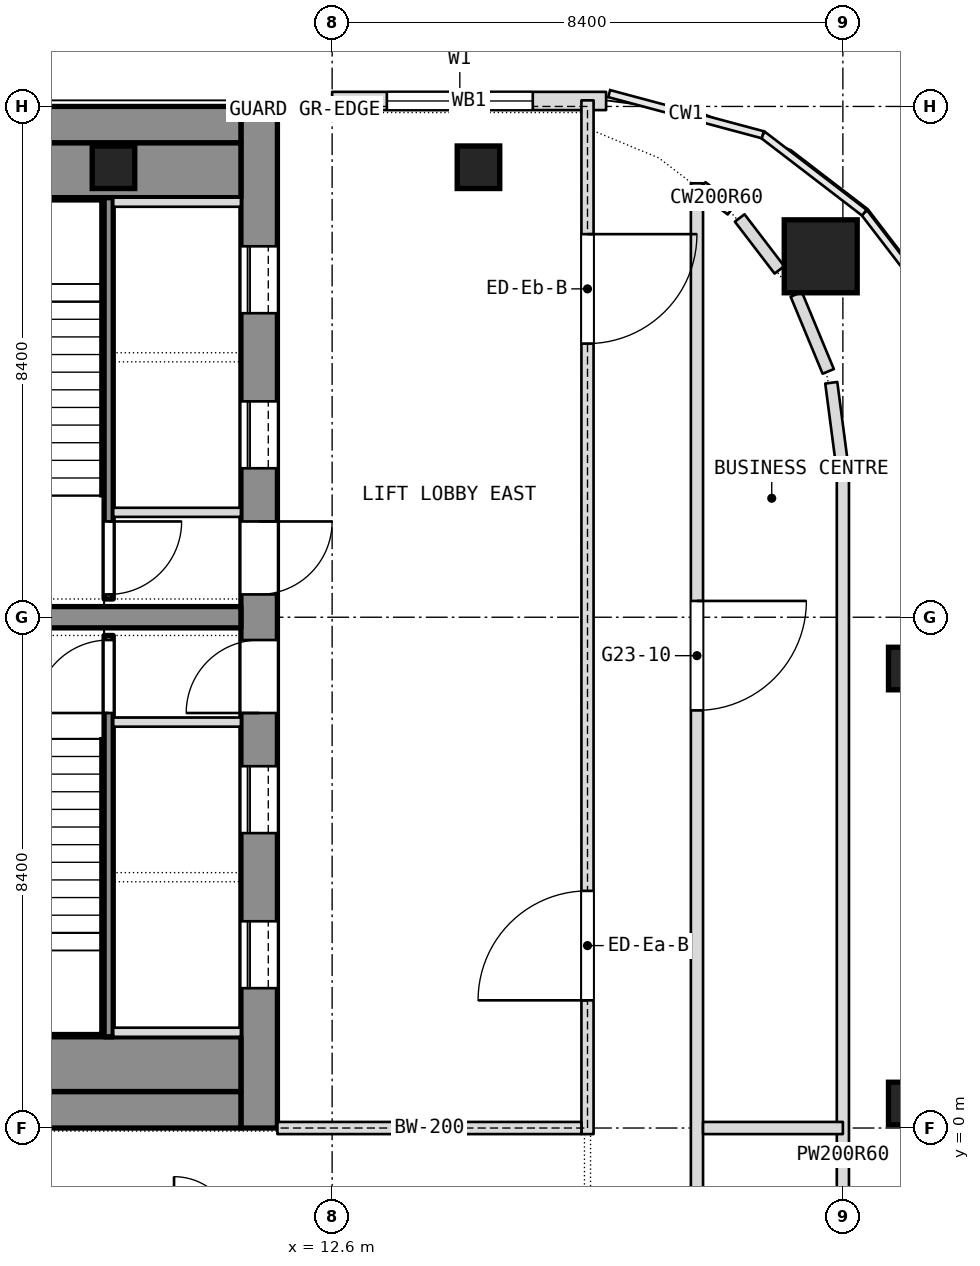
"""IFC4 building model, lengths in metres.
Left out: names, types, materials, properties, quantities, classifications, styles, units other than length and angle.
Written with IfcOpenShell. Run it as: python <this file> out.ifc"""

import sys

from ifc_helpers import new_model, si_unit, direction, frame, frame_2d, origin, origin_2d, place, context, subcontext, project, spatial, rectangle, extrude, element, fill, save


model = new_model("IFC4")
c1 = context("Model", 3, precision=1e-05, world=origin(), true_north=direction((0.0, 1.0)))
c2 = subcontext(c1, "Body", "Model", "MODEL_VIEW")
j1 = project(units=[si_unit("LENGTHUNIT", "METRE"), si_unit("PLANEANGLEUNIT", "RADIAN")], contexts=[c1])
p1 = place(None, origin())
s1 = spatial("IfcSite", under=j1, at=p1, CompositionType="ELEMENT")
p2 = place(p1, origin())
s2 = spatial("IfcBuilding", under=s1, at=p2, CompositionType="ELEMENT")
p3 = place(p2, frame((0.0, 0.0, 274.1)))
s3 = spatial("IfcBuildingStorey", under=s2, at=p3, CompositionType="ELEMENT", Elevation=274.1)
p4 = place(p3, frame((11.4, 0.0, 0.0), z_axis=(0.0, 0.0, 1.0), x_axis=(0.0, 1.0, 0.0)))
e1 = element("IfcWall", 1, at=p4, inside=s3, PredefinedType="SHEAR", context=c2, shape_type="SweptSolid", body=[
    extrude(rectangle(XDim=16.8, YDim=0.6, at=frame_2d((8.4, 0.0))), origin(), (0.0, 0.0, 1.0), 3.6),
])
p5 = place(p4, frame((2.3, 0.0, 0.0)))
e2 = element("IfcOpeningElement", 2, at=p5, cuts=e1, PredefinedType="OPENING", context=c2, shape_type="SweptSolid", body=[
    extrude(rectangle(XDim=1.1, YDim=2.1, at=frame_2d((0.55, 1.05))), frame((0.0, 0.3, 0.0), z_axis=(0.0, -1.0, 0.0), x_axis=(1.0, 0.0, 0.0)), (0.0, 0.0, 1.0), 0.6),
])
p6 = place(p4, frame((4.85, 0.0, 0.0)))
e3 = element("IfcOpeningElement", 3, at=p6, cuts=e1, PredefinedType="OPENING", context=c2, shape_type="SweptSolid", body=[
    extrude(rectangle(XDim=1.1, YDim=2.1, at=frame_2d((0.55, 1.05))), frame((0.0, 0.3, 0.0), z_axis=(0.0, -1.0, 0.0), x_axis=(1.0, 0.0, 0.0)), (0.0, 0.0, 1.0), 0.6),
])
p7 = place(p4, frame((6.825, 0.0, 0.0)))
e4 = element("IfcOpeningElement", 4, at=p7, cuts=e1, PredefinedType="OPENING", context=c2, shape_type="SweptSolid", body=[
    extrude(rectangle(XDim=1.2, YDim=2.1, at=frame_2d((0.6, 1.05))), frame((0.0, 0.3, 0.0), z_axis=(0.0, -1.0, 0.0), x_axis=(1.0, 0.0, 0.0)), (0.0, 0.0, 1.0), 0.6),
])
p8 = place(p4, frame((13.4, 0.0, 0.0)))
e5 = element("IfcOpeningElement", 5, at=p8, cuts=e1, PredefinedType="OPENING", context=c2, shape_type="SweptSolid", body=[
    extrude(rectangle(XDim=1.1, YDim=2.1, at=frame_2d((0.55, 1.05))), frame((0.0, 0.3, 0.0), z_axis=(0.0, -1.0, 0.0), x_axis=(1.0, 0.0, 0.0)), (0.0, 0.0, 1.0), 0.6),
])
p9 = place(p4, frame((10.85, 0.0, 0.0)))
e6 = element("IfcOpeningElement", 6, at=p9, cuts=e1, PredefinedType="OPENING", context=c2, shape_type="SweptSolid", body=[
    extrude(rectangle(XDim=1.1, YDim=2.1, at=frame_2d((0.55, 1.05))), frame((0.0, 0.3, 0.0), z_axis=(0.0, -1.0, 0.0), x_axis=(1.0, 0.0, 0.0)), (0.0, 0.0, 1.0), 0.6),
])
p10 = place(p4, frame((8.775, 0.0, 0.0)))
e7 = element("IfcOpeningElement", 7, at=p10, cuts=e1, PredefinedType="OPENING", context=c2, shape_type="SweptSolid", body=[
    extrude(rectangle(XDim=1.2, YDim=2.1, at=frame_2d((0.6, 1.05))), frame((0.0, 0.3, 0.0), z_axis=(0.0, -1.0, 0.0), x_axis=(1.0, 0.0, 0.0)), (0.0, 0.0, 1.0), 0.6),
])
for number, where, z_axis, x_axis in (
    (8, (-11.1, 0.3, 0.0), (0.0, 0.0, 1.0), (1.0, 0.0, 0.0)),
    (9, (-11.1, 16.5, 0.0), (0.0, 0.0, 1.0), (1.0, 0.0, 0.0)),
):
    element("IfcWall", number, at=place(p3, frame(where, z_axis=z_axis, x_axis=x_axis)), inside=s3, PredefinedType="SHEAR", context=c2, shape_type="SweptSolid", body=[
        extrude(rectangle(XDim=22.2, YDim=0.6, at=frame_2d((11.1, 0.0))), origin(), (0.0, 0.0, 1.0), 3.6),
    ])
p11 = place(p3, frame((4.375, 8.4, 0.0), z_axis=(0.0, 0.0, 1.0), x_axis=(1.0, 0.0, 0.0)))
e10 = element("IfcWall", 10, at=p11, inside=s3, PredefinedType="SHEAR", context=c2, shape_type="SweptSolid", body=[
    extrude(rectangle(XDim=6.725, YDim=0.35, at=frame_2d((3.363, 0.0))), origin(), (0.0, 0.0, 1.0), 3.6),
])
p12 = place(p3, frame((20.635, 14.335, 0.0), z_axis=(0.0, 0.0, 1.0), x_axis=(1.0, 0.0, 0.0)))
e11 = element("IfcColumn", 11, at=p12, inside=s3, PredefinedType="COLUMN", context=c2, shape_type="SweptSolid", body=[
    extrude(rectangle(XDim=1.2, YDim=1.2, at=origin_2d()), origin(), (0.0, 0.0, 1.0), 3.6),
])
for number, where, z_axis, x_axis in (
    (12, (9.004, 15.8, 0.0), (0.0, 0.0, 1.0), (1.0, 0.0, 0.0)),
    (13, (15.007, 15.8, 0.0), (0.0, 0.0, 1.0), (1.0, 0.0, 0.0)),
    (14, (22.1, 7.556, 0.0), (0.0, 0.0, 1.0), (1.0, 0.0, 0.0)),
    (15, (22.1, 0.403, 0.0), (0.0, 0.0, 1.0), (1.0, 0.0, 0.0)),
):
    element("IfcColumn", number, at=place(p3, frame(where, z_axis=z_axis, x_axis=x_axis)), inside=s3, PredefinedType="COLUMN", context=c2, shape_type="SweptSolid", body=[
        extrude(rectangle(XDim=0.7, YDim=0.7, at=origin_2d()), origin(), (0.0, 0.0, 1.0), 3.6),
    ])
p13 = place(p3, frame((21.0, -11.6, 0.0), z_axis=(0.0, 0.0, 1.0), x_axis=(0.0, 1.0, 0.0)))
e16 = element("IfcWall", 16, at=p13, inside=s3, PredefinedType="PARTITIONING", context=c2, shape_type="SweptSolid", body=[
    extrude(rectangle(XDim=22.302, YDim=0.2, at=frame_2d((11.151, 0.0))), origin(), (0.0, 0.0, 1.0), 3.34),
])
p14 = place(p3, frame((18.6, -11.8, 0.0), z_axis=(0.0, 0.0, 1.0), x_axis=(0.0, 1.0, 0.0)))
e17 = element("IfcWall", 17, at=p14, inside=s3, PredefinedType="PARTITIONING", context=c2, shape_type="SweptSolid", body=[
    extrude(rectangle(XDim=27.336, YDim=0.2, at=frame_2d((13.668, 0.0))), origin(), (0.0, 0.0, 1.0), 3.34),
])
p15 = place(p14, frame((18.668, 0.0, 0.0)))
e18 = element("IfcOpeningElement", 18, at=p15, cuts=e17, PredefinedType="OPENING", context=c2, shape_type="SweptSolid", body=[
    extrude(rectangle(XDim=1.8, YDim=2.1, at=frame_2d((0.9, 1.05))), frame((0.0, 0.1, 0.0), z_axis=(0.0, -1.0, 0.0), x_axis=(1.0, 0.0, 0.0)), (0.0, 0.0, 1.0), 0.2),
])
p16 = place(p14, frame((5.45, 0.0, 0.0)))
e19 = element("IfcOpeningElement", 19, at=p16, cuts=e17, PredefinedType="OPENING", context=c2, shape_type="SweptSolid", body=[
    extrude(rectangle(XDim=1.0, YDim=2.1, at=frame_2d((0.5, 1.05))), frame((0.0, 0.1, 0.0), z_axis=(0.0, -1.0, 0.0), x_axis=(1.0, 0.0, 0.0)), (0.0, 0.0, 1.0), 0.2),
])
p17 = place(p3, frame((18.7, 0.0, 0.0), z_axis=(0.0, 0.0, 1.0), x_axis=(1.0, 0.0, 0.0)))
e20 = element("IfcWall", 20, at=p17, inside=s3, PredefinedType="PARTITIONING", context=c2, shape_type="SweptSolid", body=[
    extrude(rectangle(XDim=2.3, YDim=0.2, at=frame_2d((1.15, 0.0))), origin(), (0.0, 0.0, 1.0), 3.0),
])
p18 = place(p3, frame((20.809, 12.256, 0.0), z_axis=(0.0, 0.0, 1.0), x_axis=(0.129841713905, -0.991534734303, 0.0)))
e21 = element("IfcWall", 21, at=p18, inside=s3, PredefinedType="PARTITIONING", context=c2, shape_type="SweptSolid", body=[
    extrude(rectangle(XDim=1.371, YDim=0.2, at=frame_2d((0.686, 0.0))), origin(), (0.0, 0.0, 1.0), 3.34),
])
p19 = place(p3, frame((18.679, 15.475, 0.0), z_axis=(0.0, 0.0, 1.0), x_axis=(0.794663000987, -0.607050833837, 0.0)))
e22 = element("IfcWall", 22, at=p19, inside=s3, PredefinedType="PARTITIONING", context=c2, shape_type="SweptSolid", body=[
    extrude(rectangle(XDim=0.613, YDim=0.2, at=frame_2d((0.306, 0.0))), origin(), (0.0, 0.0, 1.0), 3.34),
])
p20 = place(p3, frame((20.233, 13.71, 0.0), z_axis=(0.0, 0.0, 1.0), x_axis=(0.383540942064, -0.923523873953, 0.0)))
e23 = element("IfcWall", 23, at=p20, inside=s3, PredefinedType="PARTITIONING", context=c2, shape_type="SweptSolid", body=[
    extrude(rectangle(XDim=1.372, YDim=0.2, at=frame_2d((0.686, 0.0))), origin(), (0.0, 0.0, 1.0), 3.34),
])
p21 = place(p3, frame((19.303, 14.966, 0.0), z_axis=(0.0, 0.0, 1.0), x_axis=(0.607458536541, -0.794351387223, 0.0)))
e24 = element("IfcWall", 24, at=p21, inside=s3, PredefinedType="PARTITIONING", context=c2, shape_type="SweptSolid", body=[
    extrude(rectangle(XDim=1.075, YDim=0.2, at=frame_2d((0.538, 0.0))), origin(), (0.0, 0.0, 1.0), 3.34),
])
p22 = place(p3, frame((17.106, 16.89, 0.0), z_axis=(0.0, 0.0, 1.0), x_axis=(-1.0, 0.0, 0.0)))
e25 = element("IfcWall", 25, at=p22, inside=s3, PredefinedType="NOTDEFINED", context=c2, shape_type="SweptSolid", body=[
    extrude(rectangle(XDim=4.506, YDim=0.3, at=frame_2d((2.253, 0.0))), origin(), (0.0, 0.0, 1.0), 3.6),
])
p23 = place(p22, frame((1.206, 0.0, 0.9)))
e26 = element("IfcOpeningElement", 26, at=p23, cuts=e25, PredefinedType="OPENING", context=c2, shape_type="SweptSolid", body=[
    extrude(rectangle(XDim=2.4, YDim=2.1, at=frame_2d((1.2, 1.05))), frame((0.0, 0.15, 0.0), z_axis=(0.0, -1.0, 0.0), x_axis=(1.0, 0.0, 0.0)), (0.0, 0.0, 1.0), 0.3),
])
for number, where, z_axis, x_axis in (
    (27, (-11.1, 1.05, 0.0), (0.0, 0.0, 1.0), (1.0, 0.0, 0.0)),
    (28, (-11.1, 15.75, 0.0), (0.0, 0.0, 1.0), (1.0, 0.0, 0.0)),
):
    element("IfcWall", number, at=place(p3, frame(where, z_axis=z_axis, x_axis=x_axis)), inside=s3, PredefinedType="PARTITIONING", context=c2, shape_type="SweptSolid", body=[
        extrude(rectangle(XDim=22.2, YDim=0.9, at=frame_2d((11.1, 0.0))), origin(), (0.0, 0.0, 1.0), 3.34),
    ])
p24 = place(p3, frame((8.925, 1.5, 0.0), z_axis=(0.0, 0.0, 1.0), x_axis=(0.0, 1.0, 0.0)))
e29 = element("IfcWall", 29, at=p24, inside=s3, PredefinedType="SHEAR", context=c2, shape_type="SweptSolid", body=[
    extrude(rectangle(XDim=6.6, YDim=0.15, at=frame_2d((3.3, 0.0))), origin(), (0.0, 0.0, 1.0), 3.34),
])
p25 = place(p24, frame((5.325, 0.0, 0.0)))
e30 = element("IfcOpeningElement", 30, at=p25, cuts=e29, PredefinedType="OPENING", context=c2, shape_type="SweptSolid", body=[
    extrude(rectangle(XDim=1.2, YDim=2.1, at=frame_2d((0.6, 1.05))), frame((0.0, 0.075, 0.0), z_axis=(0.0, -1.0, 0.0), x_axis=(1.0, 0.0, 0.0)), (0.0, 0.0, 1.0), 0.15),
])
for number, where, z_axis, x_axis in (
    (31, (9.0, 6.675, 0.0), (0.0, 0.0, 1.0), (1.0, 0.0, 0.0)),
    (32, (9.0, 1.575, 0.0), (0.0, 0.0, 1.0), (1.0, 0.0, 0.0)),
):
    element("IfcWall", number, at=place(p3, frame(where, z_axis=z_axis, x_axis=x_axis)), inside=s3, PredefinedType="SHEAR", context=c2, shape_type="SweptSolid", body=[
        extrude(rectangle(XDim=2.1, YDim=0.15, at=frame_2d((1.05, 0.0))), origin(), (0.0, 0.0, 1.0), 3.6),
    ])
p26 = place(p3, frame((8.925, 8.7, 0.0), z_axis=(0.0, 0.0, 1.0), x_axis=(0.0, 1.0, 0.0)))
e33 = element("IfcWall", 33, at=p26, inside=s3, PredefinedType="SHEAR", context=c2, shape_type="SweptSolid", body=[
    extrude(rectangle(XDim=6.6, YDim=0.15, at=frame_2d((3.3, 0.0))), origin(), (0.0, 0.0, 1.0), 3.34),
])
p27 = place(p26, frame((0.075, 0.0, 0.0)))
e34 = element("IfcOpeningElement", 34, at=p27, cuts=e33, PredefinedType="OPENING", context=c2, shape_type="SweptSolid", body=[
    extrude(rectangle(XDim=1.2, YDim=2.1, at=frame_2d((0.6, 1.05))), frame((0.0, 0.075, 0.0), z_axis=(0.0, -1.0, 0.0), x_axis=(1.0, 0.0, 0.0)), (0.0, 0.0, 1.0), 0.15),
])
for number, where, z_axis, x_axis in (
    (35, (9.0, 10.125, 0.0), (0.0, 0.0, 1.0), (1.0, 0.0, 0.0)),
    (36, (9.0, 15.225, 0.0), (0.0, 0.0, 1.0), (1.0, 0.0, 0.0)),
):
    element("IfcWall", number, at=place(p3, frame(where, z_axis=z_axis, x_axis=x_axis)), inside=s3, PredefinedType="SHEAR", context=c2, shape_type="SweptSolid", body=[
        extrude(rectangle(XDim=2.1, YDim=0.15, at=frame_2d((1.05, 0.0))), origin(), (0.0, 0.0, 1.0), 3.6),
    ])
p28 = place(p3, frame((16.8, -0.1, 0.0), z_axis=(0.0, 0.0, 1.0), x_axis=(0.0, 1.0, 0.0)))
e37 = element("IfcWall", 37, at=p28, inside=s3, PredefinedType="PARTITIONING", context=c2, shape_type="SweptSolid", body=[
    extrude(rectangle(XDim=17.0, YDim=0.2, at=frame_2d((8.5, 0.0))), origin(), (0.0, 0.0, 1.0), 3.34),
])
p29 = place(p28, frame((2.2, 0.0, 0.0)))
e38 = element("IfcOpeningElement", 38, at=p29, cuts=e37, PredefinedType="OPENING", context=c2, shape_type="SweptSolid", body=[
    extrude(rectangle(XDim=1.8, YDim=2.1, at=frame_2d((0.9, 1.05))), frame((0.0, 0.1, 0.0), z_axis=(0.0, -1.0, 0.0), x_axis=(1.0, 0.0, 0.0)), (0.0, 0.0, 1.0), 0.2),
])
p30 = place(p28, frame((13.0, 0.0, 0.0)))
e39 = element("IfcOpeningElement", 39, at=p30, cuts=e37, PredefinedType="OPENING", context=c2, shape_type="SweptSolid", body=[
    extrude(rectangle(XDim=1.8, YDim=2.1, at=frame_2d((0.9, 1.05))), frame((0.0, 0.1, 0.0), z_axis=(0.0, -1.0, 0.0), x_axis=(1.0, 0.0, 0.0)), (0.0, 0.0, 1.0), 0.2),
])
p31 = place(p3, frame((11.7, 0.0, 0.0), z_axis=(0.0, 0.0, 1.0), x_axis=(1.0, 0.0, 0.0)))
e40 = element("IfcWall", 40, at=p31, inside=s3, PredefinedType="PARTITIONING", context=c2, shape_type="SweptSolid", body=[
    extrude(rectangle(XDim=5.0, YDim=0.2, at=frame_2d((2.5, 0.0))), origin(), (0.0, 0.0, 1.0), 3.0),
])
p32 = place(p15, origin())
e41 = element("IfcDoor", 41, at=p32, inside=s3, OperationType="DOUBLE_DOOR_SINGLE_SWING", PredefinedType="DOOR", context=c2, shape_type="SweptSolid", body=[
    extrude(rectangle(XDim=1.8, YDim=2.1, at=frame_2d((0.9, 1.05))), frame((0.0, 0.025, 0.0), z_axis=(0.0, -1.0, 0.0), x_axis=(1.0, 0.0, 0.0)), (0.0, 0.0, 1.0), 0.05),
])
fill(e18, e41)
p33 = place(p23, origin())
e42 = element("IfcWindow", 42, at=p33, inside=s3, PartitioningType="SINGLE_PANEL", PredefinedType="WINDOW", context=c2, shape_type="SweptSolid", body=[
    extrude(rectangle(XDim=2.4, YDim=2.1, at=frame_2d((1.2, 1.05))), frame((0.0, 0.03, 0.0), z_axis=(0.0, -1.0, 0.0), x_axis=(1.0, 0.0, 0.0)), (0.0, 0.0, 1.0), 0.06),
])
fill(e26, e42)
p34 = place(p5, origin())
e43 = element("IfcDoor", 43, at=p34, inside=s3, OperationType="SLIDING_TO_LEFT", PredefinedType="DOOR", context=c2, shape_type="SweptSolid", body=[
    extrude(rectangle(XDim=1.1, YDim=2.1, at=frame_2d((0.55, 1.05))), frame((0.0, 0.025, 0.0), z_axis=(0.0, -1.0, 0.0), x_axis=(1.0, 0.0, 0.0)), (0.0, 0.0, 1.0), 0.05),
])
fill(e2, e43)
p35 = place(p6, origin())
e44 = element("IfcDoor", 44, at=p35, inside=s3, OperationType="SLIDING_TO_LEFT", PredefinedType="DOOR", context=c2, shape_type="SweptSolid", body=[
    extrude(rectangle(XDim=1.1, YDim=2.1, at=frame_2d((0.55, 1.05))), frame((0.0, 0.025, 0.0), z_axis=(0.0, -1.0, 0.0), x_axis=(1.0, 0.0, 0.0)), (0.0, 0.0, 1.0), 0.05),
])
fill(e3, e44)
p36 = place(p7, origin())
e45 = element("IfcDoor", 45, at=p36, inside=s3, OperationType="SINGLE_SWING_LEFT", PredefinedType="DOOR", context=c2, shape_type="SweptSolid", body=[
    extrude(rectangle(XDim=1.2, YDim=2.1, at=frame_2d((0.6, 1.05))), frame((0.0, 0.025, 0.0), z_axis=(0.0, -1.0, 0.0), x_axis=(1.0, 0.0, 0.0)), (0.0, 0.0, 1.0), 0.05),
])
fill(e4, e45)
p37 = place(p25, origin())
e46 = element("IfcDoor", 46, at=p37, inside=s3, OperationType="SINGLE_SWING_LEFT", PredefinedType="DOOR", context=c2, shape_type="SweptSolid", body=[
    extrude(rectangle(XDim=1.2, YDim=2.1, at=frame_2d((0.6, 1.05))), frame((0.0, 0.025, 0.0), z_axis=(0.0, -1.0, 0.0), x_axis=(1.0, 0.0, 0.0)), (0.0, 0.0, 1.0), 0.05),
])
fill(e30, e46)
p38 = place(p8, origin())
e47 = element("IfcDoor", 47, at=p38, inside=s3, OperationType="SLIDING_TO_LEFT", PredefinedType="DOOR", context=c2, shape_type="SweptSolid", body=[
    extrude(rectangle(XDim=1.1, YDim=2.1, at=frame_2d((0.55, 1.05))), frame((0.0, 0.025, 0.0), z_axis=(0.0, -1.0, 0.0), x_axis=(1.0, 0.0, 0.0)), (0.0, 0.0, 1.0), 0.05),
])
fill(e5, e47)
p39 = place(p9, origin())
e48 = element("IfcDoor", 48, at=p39, inside=s3, OperationType="SLIDING_TO_LEFT", PredefinedType="DOOR", context=c2, shape_type="SweptSolid", body=[
    extrude(rectangle(XDim=1.1, YDim=2.1, at=frame_2d((0.55, 1.05))), frame((0.0, 0.025, 0.0), z_axis=(0.0, -1.0, 0.0), x_axis=(1.0, 0.0, 0.0)), (0.0, 0.0, 1.0), 0.05),
])
fill(e6, e48)
p40 = place(p10, origin())
e49 = element("IfcDoor", 49, at=p40, inside=s3, OperationType="SINGLE_SWING_LEFT", PredefinedType="DOOR", context=c2, shape_type="SweptSolid", body=[
    extrude(rectangle(XDim=1.2, YDim=2.1, at=frame_2d((0.6, 1.05))), frame((0.0, 0.025, 0.0), z_axis=(0.0, -1.0, 0.0), x_axis=(1.0, 0.0, 0.0)), (0.0, 0.0, 1.0), 0.05),
])
fill(e7, e49)
p41 = place(p27, origin())
e50 = element("IfcDoor", 50, at=p41, inside=s3, OperationType="SINGLE_SWING_LEFT", PredefinedType="DOOR", context=c2, shape_type="SweptSolid", body=[
    extrude(rectangle(XDim=1.2, YDim=2.1, at=frame_2d((0.6, 1.05))), frame((0.0, 0.025, 0.0), z_axis=(0.0, -1.0, 0.0), x_axis=(1.0, 0.0, 0.0)), (0.0, 0.0, 1.0), 0.05),
])
fill(e34, e50)
p42 = place(p29, origin())
e51 = element("IfcDoor", 51, at=p42, inside=s3, OperationType="DOUBLE_DOOR_SINGLE_SWING", PredefinedType="DOOR", context=c2, shape_type="SweptSolid", body=[
    extrude(rectangle(XDim=1.8, YDim=2.1, at=frame_2d((0.9, 1.05))), frame((0.0, 0.025, 0.0), z_axis=(0.0, -1.0, 0.0), x_axis=(1.0, 0.0, 0.0)), (0.0, 0.0, 1.0), 0.05),
])
fill(e38, e51)
p43 = place(p30, origin())
e52 = element("IfcDoor", 52, at=p43, inside=s3, OperationType="DOUBLE_DOOR_SINGLE_SWING", PredefinedType="DOOR", context=c2, shape_type="SweptSolid", body=[
    extrude(rectangle(XDim=1.8, YDim=2.1, at=frame_2d((0.9, 1.05))), frame((0.0, 0.025, 0.0), z_axis=(0.0, -1.0, 0.0), x_axis=(1.0, 0.0, 0.0)), (0.0, 0.0, 1.0), 0.05),
])
fill(e39, e52)
save(model, sys.argv[1])
